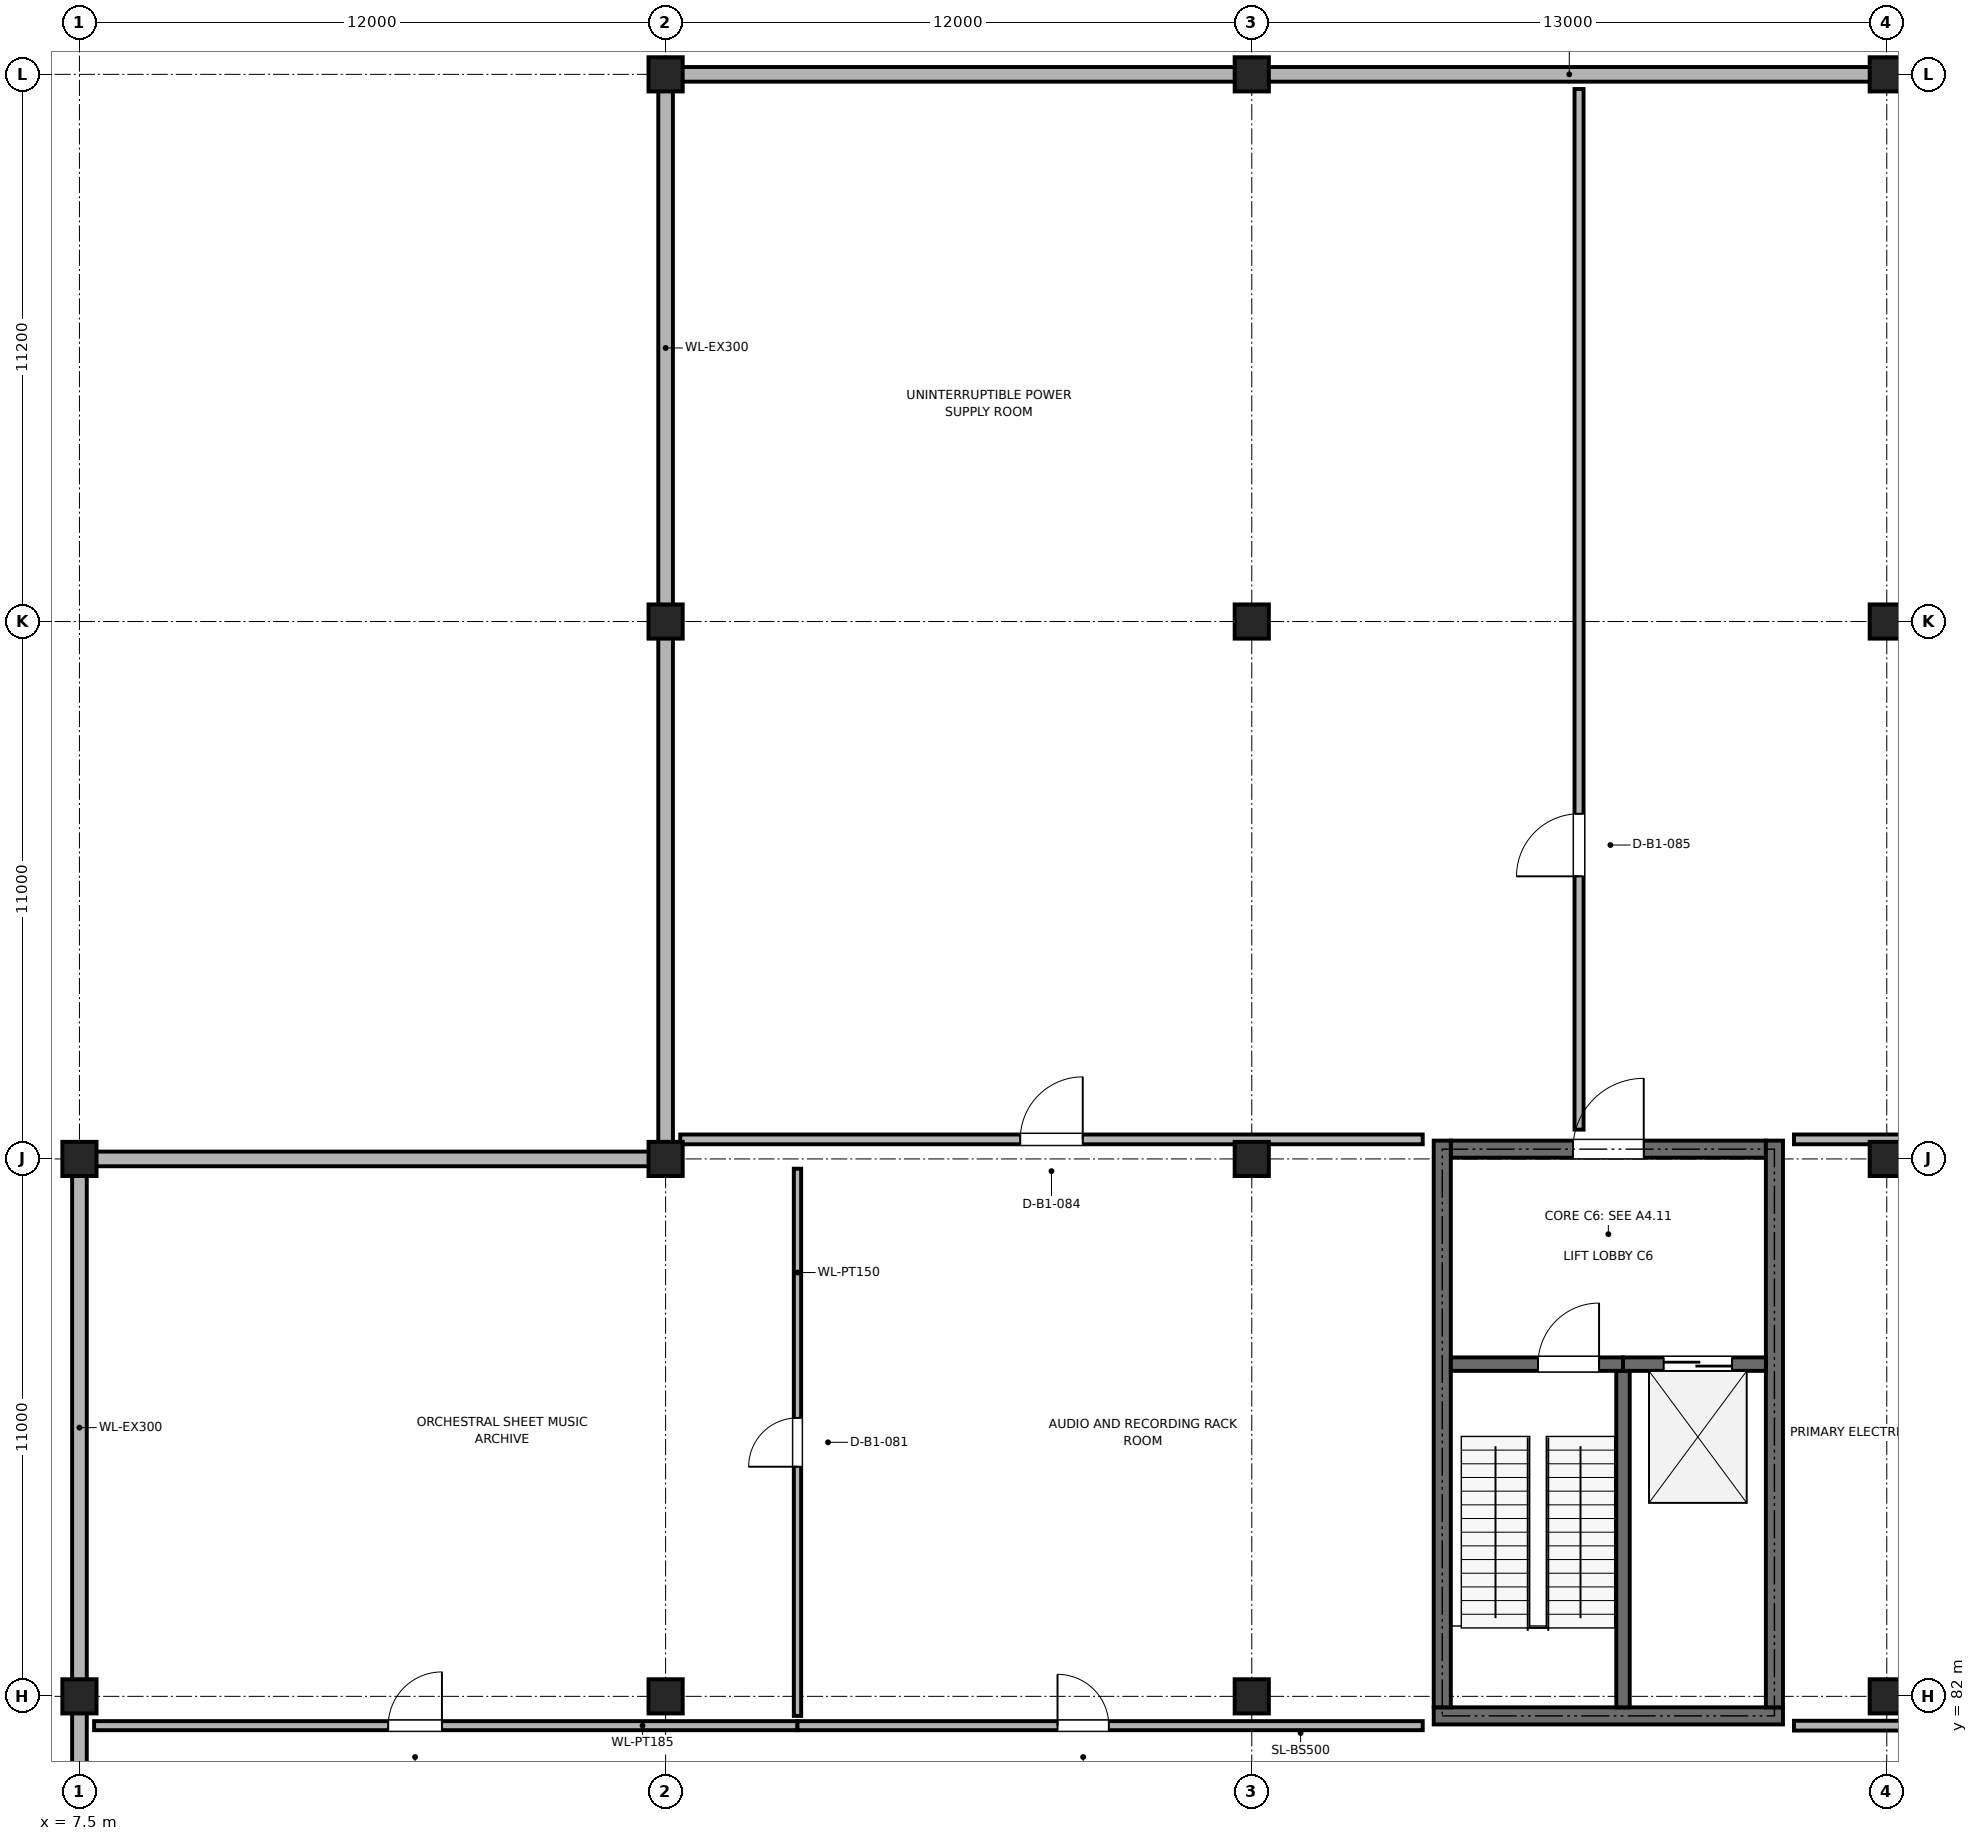
"""IFC4 building model, lengths in metres.
Left out: names, types, materials, properties, quantities, classifications, styles, units other than length and angle.
Written with IfcOpenShell. Run it as: python <this file> out.ifc"""

import sys

from ifc_helpers import new_model, si_unit, direction, frame, frame_2d, origin, origin_2d, place, context, subcontext, project, spatial, rectangle, extrude, element, fill, save


model = new_model("IFC4")
c1 = context("Model", 3, precision=1e-05, world=origin(), true_north=direction((0.0, 1.0)))
c2 = subcontext(c1, "Body", "Model", "MODEL_VIEW")
j1 = project(units=[si_unit("LENGTHUNIT", "METRE"), si_unit("PLANEANGLEUNIT", "RADIAN")], contexts=[c1])
p1 = place(None, origin())
s1 = spatial("IfcSite", under=j1, at=p1, CompositionType="ELEMENT")
p2 = place(p1, origin())
s2 = spatial("IfcBuilding", under=s1, at=p2, CompositionType="ELEMENT")
p3 = place(p2, frame((0.0, 0.0, -4.8)))
s3 = spatial("IfcBuildingStorey", under=s2, at=p3, CompositionType="ELEMENT", Elevation=-4.8)
for number, where, z_axis, x_axis in (
    (1, (7.5, 82.0, 0.0), (0.0, 0.0, 1.0), (1.0, 0.0, 0.0)),
    (2, (7.5, 93.0, 0.0), (0.0, 0.0, 1.0), (1.0, 0.0, 0.0)),
    (3, (19.5, 82.0, 0.0), (0.0, 0.0, 1.0), (1.0, 0.0, 0.0)),
    (4, (19.5, 93.0, 0.0), (0.0, 0.0, 1.0), (1.0, 0.0, 0.0)),
    (5, (19.5, 104.0, 0.0), (0.0, 0.0, 1.0), (1.0, 0.0, 0.0)),
    (6, (19.5, 115.2, 0.0), (0.0, 0.0, 1.0), (1.0, 0.0, 0.0)),
    (7, (31.5, 82.0, 0.0), (0.0, 0.0, 1.0), (1.0, 0.0, 0.0)),
    (8, (31.5, 93.0, 0.0), (0.0, 0.0, 1.0), (1.0, 0.0, 0.0)),
    (9, (31.5, 104.0, 0.0), (0.0, 0.0, 1.0), (1.0, 0.0, 0.0)),
    (10, (31.5, 115.2, 0.0), (0.0, 0.0, 1.0), (1.0, 0.0, 0.0)),
    (11, (44.5, 82.0, 0.0), (0.0, 0.0, 1.0), (1.0, 0.0, 0.0)),
    (12, (44.5, 93.0, 0.0), (0.0, 0.0, 1.0), (1.0, 0.0, 0.0)),
    (13, (44.5, 104.0, 0.0), (0.0, 0.0, 1.0), (1.0, 0.0, 0.0)),
    (14, (44.5, 115.2, 0.0), (0.0, 0.0, 1.0), (1.0, 0.0, 0.0)),
):
    element("IfcColumn", number, at=place(p3, frame(where, z_axis=z_axis, x_axis=x_axis)), inside=s3, PredefinedType="COLUMN", context=c2, shape_type="SweptSolid", body=[
        extrude(rectangle(XDim=0.7, YDim=0.7, at=origin_2d()), origin(), (0.0, 0.0, 1.0), 4.8),
    ])
for number, where, z_axis, x_axis in (
    (15, (44.52, 115.2, 0.0), (0.0, 0.0, 1.0), (1.0, 0.0, 0.0)),
    (16, (31.52, 115.2, 0.0), (0.0, 0.0, 1.0), (1.0, 0.0, 0.0)),
):
    element("IfcWall", number, at=place(p3, frame(where, z_axis=z_axis, x_axis=x_axis)), inside=s3, PredefinedType="SOLIDWALL", context=c2, shape_type="SweptSolid", body=[
        extrude(rectangle(XDim=12.96, YDim=0.3, at=frame_2d((6.48, 0.0))), origin(), (0.0, 0.0, 1.0), 3.638),
    ])
p4 = place(p3, frame((19.52, 115.2, 0.0), z_axis=(0.0, 0.0, 1.0), x_axis=(1.0, 0.0, 0.0)))
e17 = element("IfcWall", 17, at=p4, inside=s3, PredefinedType="SOLIDWALL", context=c2, shape_type="SweptSolid", body=[
    extrude(rectangle(XDim=11.96, YDim=0.3, at=frame_2d((5.98, 0.0))), origin(), (0.0, 0.0, 1.0), 3.638),
])
p5 = place(p3, frame((19.5, 104.02, 0.0), z_axis=(0.0, 0.0, 1.0), x_axis=(0.0, 1.0, 0.0)))
e18 = element("IfcWall", 18, at=p5, inside=s3, PredefinedType="SOLIDWALL", context=c2, shape_type="SweptSolid", body=[
    extrude(rectangle(XDim=11.16, YDim=0.3, at=frame_2d((5.58, 0.0))), origin(), (0.0, 0.0, 1.0), 3.638),
])
p6 = place(p3, frame((19.5, 93.02, 0.0), z_axis=(0.0, 0.0, 1.0), x_axis=(0.0, 1.0, 0.0)))
e19 = element("IfcWall", 19, at=p6, inside=s3, PredefinedType="SOLIDWALL", context=c2, shape_type="SweptSolid", body=[
    extrude(rectangle(XDim=10.96, YDim=0.3, at=frame_2d((5.48, 0.0))), origin(), (0.0, 0.0, 1.0), 3.638),
])
p7 = place(p3, frame((7.52, 93.0, 0.0), z_axis=(0.0, 0.0, 1.0), x_axis=(1.0, 0.0, 0.0)))
e20 = element("IfcWall", 20, at=p7, inside=s3, PredefinedType="SOLIDWALL", context=c2, shape_type="SweptSolid", body=[
    extrude(rectangle(XDim=11.96, YDim=0.3, at=frame_2d((5.98, 0.0))), origin(), (0.0, 0.0, 1.0), 3.638),
])
for number, where, z_axis, x_axis in (
    (21, (7.5, 82.02, 0.0), (0.0, 0.0, 1.0), (0.0, 1.0, 0.0)),
    (22, (7.5, 71.02, 0.0), (0.0, 0.0, 1.0), (0.0, 1.0, 0.0)),
):
    element("IfcWall", number, at=place(p3, frame(where, z_axis=z_axis, x_axis=x_axis)), inside=s3, PredefinedType="SOLIDWALL", context=c2, shape_type="SweptSolid", body=[
        extrude(rectangle(XDim=10.96, YDim=0.3, at=frame_2d((5.48, 0.0))), origin(), (0.0, 0.0, 1.0), 3.638),
    ])
p8 = place(p3, frame((35.225, 81.6, 0.0), z_axis=(0.0, 0.0, 1.0), x_axis=(1.0, 0.0, 0.0)))
e23 = element("IfcWall", 23, at=p8, inside=s3, PredefinedType="SHEAR", context=c2, shape_type="SweptSolid", body=[
    extrude(rectangle(XDim=7.15, YDim=0.35, at=frame_2d((3.575, 0.0))), origin(), (0.0, 0.0, 1.0), 4.5),
])
p9 = place(p3, frame((35.575, 93.2, 0.0), z_axis=(0.0, 0.0, 1.0), x_axis=(1.0, 0.0, 0.0)))
e24 = element("IfcWall", 24, at=p9, inside=s3, PredefinedType="SHEAR", context=c2, shape_type="SweptSolid", body=[
    extrude(rectangle(XDim=6.45, YDim=0.35, at=frame_2d((3.225, 0.0))), origin(), (0.0, 0.0, 1.0), 4.5),
])
p10 = place(p9, frame((2.5, 0.0, 0.0)))
e25 = element("IfcOpeningElement", 25, at=p10, cuts=e24, PredefinedType="OPENING", context=c2, shape_type="SweptSolid", body=[
    extrude(rectangle(XDim=1.45, YDim=2.2, at=frame_2d((0.725, 1.1))), frame((0.0, 0.185, 0.0), z_axis=(0.0, -1.0, 0.0), x_axis=(1.0, 0.0, 0.0)), (0.0, 0.0, 1.0), 0.37),
])
for number, where, z_axis, x_axis in (
    (26, (35.4, 81.775, 0.0), (0.0, 0.0, 1.0), (0.0, 1.0, 0.0)),
    (27, (42.2, 81.775, 0.0), (0.0, 0.0, 1.0), (0.0, 1.0, 0.0)),
):
    element("IfcWall", number, at=place(p3, frame(where, z_axis=z_axis, x_axis=x_axis)), inside=s3, PredefinedType="SHEAR", context=c2, shape_type="SweptSolid", body=[
        extrude(rectangle(XDim=11.6, YDim=0.35, at=frame_2d((5.8, 0.0))), origin(), (0.0, 0.0, 1.0), 4.5),
    ])
p11 = place(p3, frame((39.1, 81.775, 0.0), z_axis=(0.0, 0.0, 1.0), x_axis=(0.0, 1.0, 0.0)))
e28 = element("IfcWall", 28, at=p11, inside=s3, PredefinedType="SHEAR", context=c2, shape_type="SweptSolid", body=[
    extrude(rectangle(XDim=6.888, YDim=0.275, at=frame_2d((3.444, 0.0))), origin(), (0.0, 0.0, 1.0), 4.5),
])
p12 = place(p3, frame((35.575, 88.8, 0.0), z_axis=(0.0, 0.0, 1.0), x_axis=(1.0, 0.0, 0.0)))
e29 = element("IfcWall", 29, at=p12, inside=s3, PredefinedType="SHEAR", context=c2, shape_type="SweptSolid", body=[
    extrude(rectangle(XDim=3.525, YDim=0.275, at=frame_2d((1.763, 0.0))), origin(), (0.0, 0.0, 1.0), 4.5),
])
p13 = place(p12, frame((1.785, 0.0, 0.0)))
e30 = element("IfcOpeningElement", 30, at=p13, cuts=e29, PredefinedType="OPENING", context=c2, shape_type="SweptSolid", body=[
    extrude(rectangle(XDim=1.25, YDim=2.15, at=frame_2d((0.625, 1.075))), frame((0.0, 0.147, 0.0), z_axis=(0.0, -1.0, 0.0), x_axis=(1.0, 0.0, 0.0)), (0.0, 0.0, 1.0), 0.295),
])
p14 = place(p3, frame((39.1, 88.8, 0.0), z_axis=(0.0, 0.0, 1.0), x_axis=(1.0, 0.0, 0.0)))
e31 = element("IfcWall", 31, at=p14, inside=s3, PredefinedType="SHEAR", context=c2, shape_type="SweptSolid", body=[
    extrude(rectangle(XDim=2.925, YDim=0.275, at=frame_2d((1.462, 0.0))), origin(), (0.0, 0.0, 1.0), 4.5),
])
p15 = place(p14, frame((0.833, 0.0, 0.0)))
e32 = element("IfcOpeningElement", 32, at=p15, cuts=e31, PredefinedType="OPENING", context=c2, shape_type="SweptSolid", body=[
    extrude(rectangle(XDim=1.4, YDim=2.2, at=frame_2d((0.7, 1.1))), frame((0.0, 0.147, 0.0), z_axis=(0.0, -1.0, 0.0), x_axis=(1.0, 0.0, 0.0)), (0.0, 0.0, 1.0), 0.295),
])
p16 = place(p3, frame((7.8, 81.4, 0.0), z_axis=(0.0, 0.0, 1.0), x_axis=(1.0, 0.0, 0.0)))
e33 = element("IfcWall", 33, at=p16, inside=s3, PredefinedType="PARTITIONING", context=c2, shape_type="SweptSolid", body=[
    extrude(rectangle(XDim=14.4, YDim=0.185, at=frame_2d((7.2, 0.0))), origin(), (0.0, 0.0, 1.0), 3.64),
])
p17 = place(p16, frame((6.021, 0.0, 0.0)))
e34 = element("IfcOpeningElement", 34, at=p17, cuts=e33, PredefinedType="OPENING", context=c2, shape_type="SweptSolid", body=[
    extrude(rectangle(XDim=1.1, YDim=2.15, at=frame_2d((0.55, 1.075))), frame((0.0, 0.103, 0.0), z_axis=(0.0, -1.0, 0.0), x_axis=(1.0, 0.0, 0.0)), (0.0, 0.0, 1.0), 0.205),
])
p18 = place(p3, frame((22.2, 81.4, 0.0), z_axis=(0.0, 0.0, 1.0), x_axis=(1.0, 0.0, 0.0)))
e35 = element("IfcWall", 35, at=p18, inside=s3, PredefinedType="PARTITIONING", context=c2, shape_type="SweptSolid", body=[
    extrude(rectangle(XDim=12.8, YDim=0.185, at=frame_2d((6.4, 0.0))), origin(), (0.0, 0.0, 1.0), 3.39),
])
p19 = place(p18, frame((5.323, 0.0, 0.0)))
e36 = element("IfcOpeningElement", 36, at=p19, cuts=e35, PredefinedType="OPENING", context=c2, shape_type="SweptSolid", body=[
    extrude(rectangle(XDim=1.05, YDim=2.15, at=frame_2d((0.525, 1.075))), frame((0.0, 0.103, 0.0), z_axis=(0.0, -1.0, 0.0), x_axis=(1.0, 0.0, 0.0)), (0.0, 0.0, 1.0), 0.205),
])
p20 = place(p3, frame((42.6, 81.4, 0.0), z_axis=(0.0, 0.0, 1.0), x_axis=(1.0, 0.0, 0.0)))
e37 = element("IfcWall", 37, at=p20, inside=s3, PredefinedType="PARTITIONING", context=c2, shape_type="SweptSolid", body=[
    extrude(rectangle(XDim=14.6, YDim=0.2, at=frame_2d((7.3, 0.0))), origin(), (0.0, 0.0, 1.0), 3.64),
])
p21 = place(p20, frame((6.66, 0.0, 0.0)))
e38 = element("IfcOpeningElement", 38, at=p21, cuts=e37, PredefinedType="OPENING", context=c2, shape_type="SweptSolid", body=[
    extrude(rectangle(XDim=1.28, YDim=2.18, at=frame_2d((0.64, 1.09))), frame((0.0, 0.11, 0.0), z_axis=(0.0, -1.0, 0.0), x_axis=(1.0, 0.0, 0.0)), (0.0, 0.0, 1.0), 0.22),
])
p22 = place(p3, frame((22.2, 81.6, 0.0), z_axis=(0.0, 0.0, 1.0), x_axis=(0.0, 1.0, 0.0)))
e39 = element("IfcWall", 39, at=p22, inside=s3, PredefinedType="PARTITIONING", context=c2, shape_type="SweptSolid", body=[
    extrude(rectangle(XDim=11.2, YDim=0.15, at=frame_2d((5.6, 0.0))), origin(), (0.0, 0.0, 1.0), 3.64),
])
p23 = place(p22, frame((5.1, 0.0, 0.0)))
e40 = element("IfcOpeningElement", 40, at=p23, cuts=e39, PredefinedType="OPENING", context=c2, shape_type="SweptSolid", body=[
    extrude(rectangle(XDim=1.0, YDim=2.12, at=frame_2d((0.5, 1.06))), frame((0.0, 0.085, 0.0), z_axis=(0.0, -1.0, 0.0), x_axis=(1.0, 0.0, 0.0)), (0.0, 0.0, 1.0), 0.17),
])
p24 = place(p3, frame((42.6, 93.4, 0.0), z_axis=(0.0, 0.0, 1.0), x_axis=(1.0, 0.0, 0.0)))
e41 = element("IfcWall", 41, at=p24, inside=s3, PredefinedType="PARTITIONING", context=c2, shape_type="SweptSolid", body=[
    extrude(rectangle(XDim=14.6, YDim=0.2, at=frame_2d((7.3, 0.0))), origin(), (0.0, 0.0, 1.0), 3.64),
])
p25 = place(p24, frame((6.03, 0.0, 0.0)))
e42 = element("IfcOpeningElement", 42, at=p25, cuts=e41, PredefinedType="OPENING", context=c2, shape_type="SweptSolid", body=[
    extrude(rectangle(XDim=1.28, YDim=2.18, at=frame_2d((0.64, 1.09))), frame((0.0, 0.11, 0.0), z_axis=(0.0, -1.0, 0.0), x_axis=(1.0, 0.0, 0.0)), (0.0, 0.0, 1.0), 0.22),
])
p26 = place(p24, frame((10.692, 0.0, 0.0)))
e43 = element("IfcOpeningElement", 43, at=p26, cuts=e41, PredefinedType="OPENING", context=c2, shape_type="SweptSolid", body=[
    extrude(rectangle(XDim=1.28, YDim=2.18, at=frame_2d((0.64, 1.09))), frame((0.0, 0.11, 0.0), z_axis=(0.0, -1.0, 0.0), x_axis=(1.0, 0.0, 0.0)), (0.0, 0.0, 1.0), 0.22),
])
p27 = place(p3, frame((19.8, 93.4, 0.0), z_axis=(0.0, 0.0, 1.0), x_axis=(1.0, 0.0, 0.0)))
e44 = element("IfcWall", 44, at=p27, inside=s3, PredefinedType="PARTITIONING", context=c2, shape_type="SweptSolid", body=[
    extrude(rectangle(XDim=15.2, YDim=0.2, at=frame_2d((7.6, 0.0))), origin(), (0.0, 0.0, 1.0), 3.64),
])
p28 = place(p27, frame((6.96, 0.0, 0.0)))
e45 = element("IfcOpeningElement", 45, at=p28, cuts=e44, PredefinedType="OPENING", context=c2, shape_type="SweptSolid", body=[
    extrude(rectangle(XDim=1.28, YDim=2.18, at=frame_2d((0.64, 1.09))), frame((0.0, 0.11, 0.0), z_axis=(0.0, -1.0, 0.0), x_axis=(1.0, 0.0, 0.0)), (0.0, 0.0, 1.0), 0.22),
])
p29 = place(p3, frame((38.2, 93.6, 0.0), z_axis=(0.0, 0.0, 1.0), x_axis=(0.0, 1.0, 0.0)))
e46 = element("IfcWall", 46, at=p29, inside=s3, PredefinedType="PARTITIONING", context=c2, shape_type="SweptSolid", body=[
    extrude(rectangle(XDim=21.3, YDim=0.185, at=frame_2d((10.65, 0.0))), origin(), (0.0, 0.0, 1.0), 3.54),
])
p30 = place(p29, frame((5.185, 0.0, 0.0)))
e47 = element("IfcOpeningElement", 47, at=p30, cuts=e46, PredefinedType="OPENING", context=c2, shape_type="SweptSolid", body=[
    extrude(rectangle(XDim=1.28, YDim=2.18, at=frame_2d((0.64, 1.09))), frame((0.0, 0.103, 0.0), z_axis=(0.0, -1.0, 0.0), x_axis=(1.0, 0.0, 0.0)), (0.0, 0.0, 1.0), 0.205),
])
p31 = place(p13, origin())
e48 = element("IfcDoor", 48, at=p31, inside=s3, OperationType="SINGLE_SWING_RIGHT", PredefinedType="DOOR", context=c2, shape_type="SweptSolid", body=[
    extrude(rectangle(XDim=1.25, YDim=2.15, at=frame_2d((0.625, 1.075))), frame((0.0, 0.025, 0.0), z_axis=(0.0, -1.0, 0.0), x_axis=(1.0, 0.0, 0.0)), (0.0, 0.0, 1.0), 0.05),
])
fill(e30, e48)
p32 = place(p15, origin())
e49 = element("IfcDoor", 49, at=p32, inside=s3, OperationType="DOUBLE_DOOR_SLIDING", PredefinedType="DOOR", context=c2, shape_type="SweptSolid", body=[
    extrude(rectangle(XDim=1.4, YDim=2.2, at=frame_2d((0.7, 1.1))), frame((0.0, 0.025, 0.0), z_axis=(0.0, -1.0, 0.0), x_axis=(1.0, 0.0, 0.0)), (0.0, 0.0, 1.0), 0.05),
])
fill(e32, e49)
p33 = place(p10, origin())
e50 = element("IfcDoor", 50, at=p33, inside=s3, OperationType="SINGLE_SWING_RIGHT", PredefinedType="DOOR", context=c2, shape_type="SweptSolid", body=[
    extrude(rectangle(XDim=1.45, YDim=2.2, at=frame_2d((0.725, 1.1))), frame((0.0, 0.025, 0.0), z_axis=(0.0, -1.0, 0.0), x_axis=(1.0, 0.0, 0.0)), (0.0, 0.0, 1.0), 0.05),
])
fill(e25, e50)
p34 = place(p17, origin())
e51 = element("IfcDoor", 51, at=p34, inside=s3, OperationType="SINGLE_SWING_RIGHT", PredefinedType="DOOR", context=c2, shape_type="SweptSolid", body=[
    extrude(rectangle(XDim=1.1, YDim=2.15, at=frame_2d((0.55, 1.075))), frame((0.0, 0.025, 0.0), z_axis=(0.0, -1.0, 0.0), x_axis=(1.0, 0.0, 0.0)), (0.0, 0.0, 1.0), 0.05),
])
fill(e34, e51)
p35 = place(p19, origin())
e52 = element("IfcDoor", 52, at=p35, inside=s3, OperationType="SINGLE_SWING_LEFT", PredefinedType="DOOR", context=c2, shape_type="SweptSolid", body=[
    extrude(rectangle(XDim=1.05, YDim=2.15, at=frame_2d((0.525, 1.075))), frame((0.0, 0.025, 0.0), z_axis=(0.0, -1.0, 0.0), x_axis=(1.0, 0.0, 0.0)), (0.0, 0.0, 1.0), 0.05),
])
fill(e36, e52)
p36 = place(p23, origin())
e53 = element("IfcDoor", 53, at=p36, inside=s3, OperationType="SINGLE_SWING_LEFT", PredefinedType="DOOR", context=c2, shape_type="SweptSolid", body=[
    extrude(rectangle(XDim=1.0, YDim=2.12, at=frame_2d((0.5, 1.06))), frame((0.0, 0.025, 0.0), z_axis=(0.0, -1.0, 0.0), x_axis=(1.0, 0.0, 0.0)), (0.0, 0.0, 1.0), 0.05),
])
fill(e40, e53)
p37 = place(p28, origin())
e54 = element("IfcDoor", 54, at=p37, inside=s3, OperationType="SINGLE_SWING_RIGHT", PredefinedType="DOOR", context=c2, shape_type="SweptSolid", body=[
    extrude(rectangle(XDim=1.28, YDim=2.18, at=frame_2d((0.64, 1.09))), frame((0.0, 0.025, 0.0), z_axis=(0.0, -1.0, 0.0), x_axis=(1.0, 0.0, 0.0)), (0.0, 0.0, 1.0), 0.05),
])
fill(e45, e54)
p38 = place(p30, origin())
e55 = element("IfcDoor", 55, at=p38, inside=s3, OperationType="SINGLE_SWING_LEFT", PredefinedType="DOOR", context=c2, shape_type="SweptSolid", body=[
    extrude(rectangle(XDim=1.28, YDim=2.18, at=frame_2d((0.64, 1.09))), frame((0.0, 0.025, 0.0), z_axis=(0.0, -1.0, 0.0), x_axis=(1.0, 0.0, 0.0)), (0.0, 0.0, 1.0), 0.05),
])
fill(e47, e55)
save(model, sys.argv[1])
